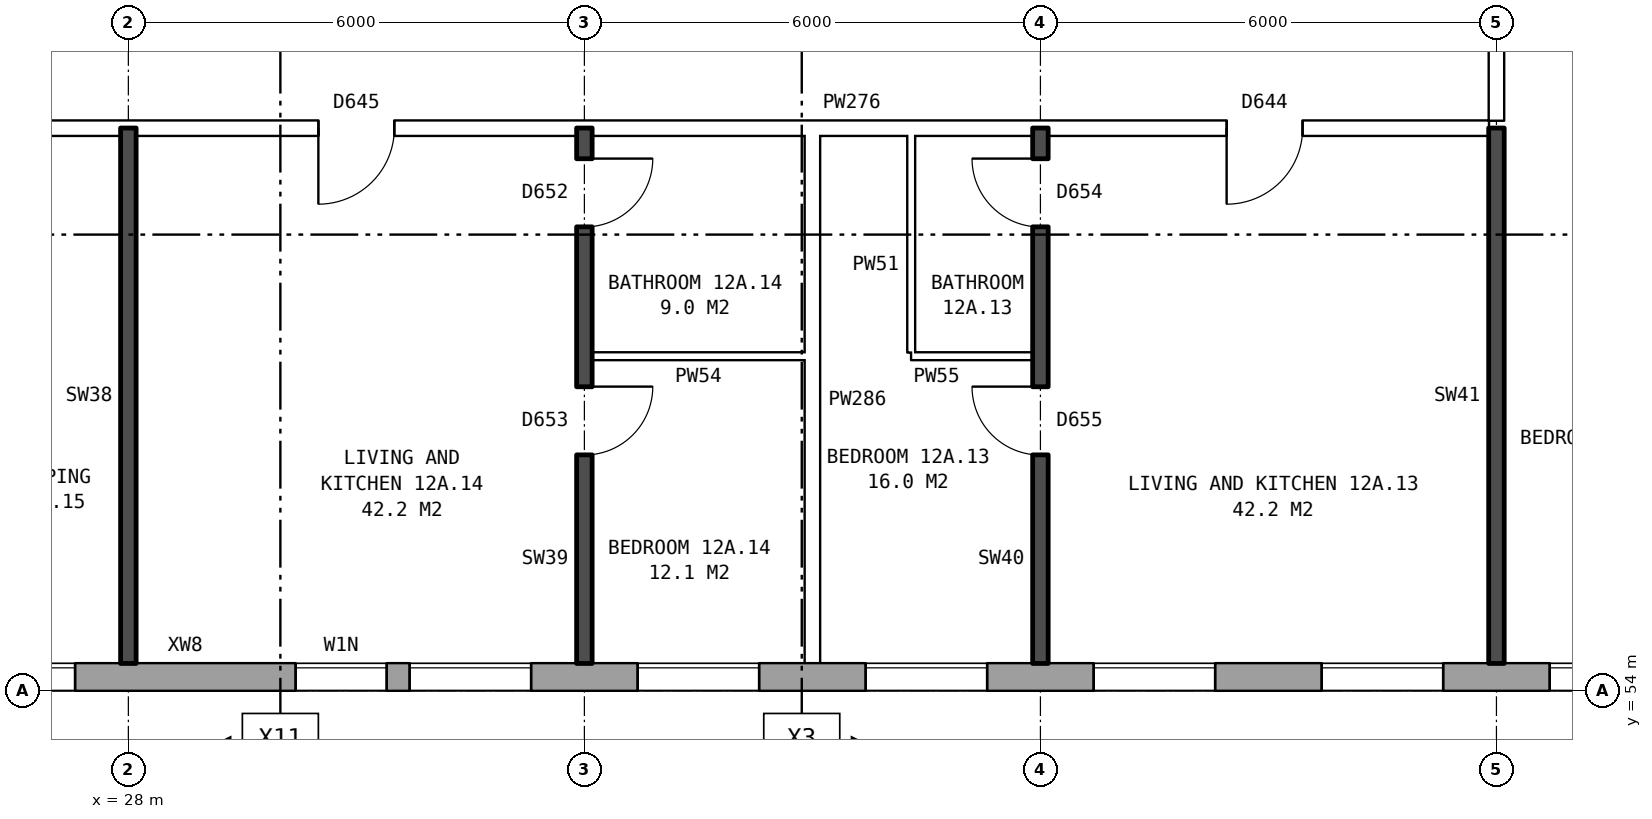
"""IFC4 building model, lengths in metres.
Left out: names, types, materials, properties, quantities, classifications, styles, units other than length and angle.
Written with IfcOpenShell. Run it as: python <this file> out.ifc"""

import sys

from ifc_helpers import new_model, si_unit, direction, frame, frame_2d, origin, place, context, subcontext, project, spatial, rectangle, extrude, element, fill, save


model = new_model("IFC4")
c1 = context("Model", 3, precision=1e-05, world=origin(), true_north=direction((0.0, 1.0)))
c2 = subcontext(c1, "Body", "Model", "MODEL_VIEW")
j1 = project(units=[si_unit("LENGTHUNIT", "METRE"), si_unit("PLANEANGLEUNIT", "RADIAN")], contexts=[c1])
p1 = place(None, origin())
s1 = spatial("IfcSite", under=j1, at=p1, CompositionType="ELEMENT")
p2 = place(p1, origin())
s2 = spatial("IfcBuilding", under=s1, at=p2, CompositionType="ELEMENT")
p3 = place(p2, frame((0.0, 0.0, 47.4)))
s3 = spatial("IfcBuildingStorey", under=s2, at=p3, CompositionType="ELEMENT", Elevation=47.4)
p4 = place(p3, frame((24.575, 54.18, 0.0), z_axis=(0.0, 0.0, 1.0), x_axis=(1.0, 0.0, 0.0)))
e1 = element("IfcWall", 1, at=p4, inside=s3, PredefinedType="STANDARD", context=c2, shape_type="SweptSolid", body=[
    extrude(rectangle(XDim=48.351, YDim=0.36, at=frame_2d((24.175, 0.0))), origin(), (0.0, 0.0, 1.0), 2.85),
])
p5 = place(p4, frame((1.125, 0.0, 0.8)))
e2 = element("IfcOpeningElement", 2, at=p5, cuts=e1, PredefinedType="OPENING", context=c2, shape_type="SweptSolid", body=[
    extrude(rectangle(XDim=1.6, YDim=1.8, at=frame_2d((0.8, 0.9))), frame((0.0, 0.19, 0.0), z_axis=(0.0, -1.0, 0.0), x_axis=(1.0, 0.0, 0.0)), (0.0, 0.0, 1.0), 0.38),
])
p6 = place(p4, frame((5.625, 0.0, 0.8)))
e3 = element("IfcOpeningElement", 3, at=p6, cuts=e1, PredefinedType="OPENING", context=c2, shape_type="SweptSolid", body=[
    extrude(rectangle(XDim=1.2, YDim=1.2, at=frame_2d((0.6, 0.6))), frame((0.0, 0.19, 0.0), z_axis=(0.0, -1.0, 0.0), x_axis=(1.0, 0.0, 0.0)), (0.0, 0.0, 1.0), 0.38),
])
p7 = place(p4, frame((7.125, 0.0, 0.8)))
e4 = element("IfcOpeningElement", 4, at=p7, cuts=e1, PredefinedType="OPENING", context=c2, shape_type="SweptSolid", body=[
    extrude(rectangle(XDim=1.6, YDim=1.8, at=frame_2d((0.8, 0.9))), frame((0.0, 0.19, 0.0), z_axis=(0.0, -1.0, 0.0), x_axis=(1.0, 0.0, 0.0)), (0.0, 0.0, 1.0), 0.38),
])
p8 = place(p4, frame((10.125, 0.0, 0.8)))
e5 = element("IfcOpeningElement", 5, at=p8, cuts=e1, PredefinedType="OPENING", context=c2, shape_type="SweptSolid", body=[
    extrude(rectangle(XDim=1.6, YDim=1.8, at=frame_2d((0.8, 0.9))), frame((0.0, 0.19, 0.0), z_axis=(0.0, -1.0, 0.0), x_axis=(1.0, 0.0, 0.0)), (0.0, 0.0, 1.0), 0.38),
])
p9 = place(p4, frame((13.125, 0.0, 0.8)))
e6 = element("IfcOpeningElement", 6, at=p9, cuts=e1, PredefinedType="OPENING", context=c2, shape_type="SweptSolid", body=[
    extrude(rectangle(XDim=1.6, YDim=1.8, at=frame_2d((0.8, 0.9))), frame((0.0, 0.19, 0.0), z_axis=(0.0, -1.0, 0.0), x_axis=(1.0, 0.0, 0.0)), (0.0, 0.0, 1.0), 0.38),
])
p10 = place(p4, frame((16.125, 0.0, 0.8)))
e7 = element("IfcOpeningElement", 7, at=p10, cuts=e1, PredefinedType="OPENING", context=c2, shape_type="SweptSolid", body=[
    extrude(rectangle(XDim=1.6, YDim=1.8, at=frame_2d((0.8, 0.9))), frame((0.0, 0.19, 0.0), z_axis=(0.0, -1.0, 0.0), x_axis=(1.0, 0.0, 0.0)), (0.0, 0.0, 1.0), 0.38),
])
p11 = place(p4, frame((19.125, 0.0, 0.8)))
e8 = element("IfcOpeningElement", 8, at=p11, cuts=e1, PredefinedType="OPENING", context=c2, shape_type="SweptSolid", body=[
    extrude(rectangle(XDim=1.6, YDim=1.8, at=frame_2d((0.8, 0.9))), frame((0.0, 0.19, 0.0), z_axis=(0.0, -1.0, 0.0), x_axis=(1.0, 0.0, 0.0)), (0.0, 0.0, 1.0), 0.38),
])
p12 = place(p4, frame((22.125, 0.0, 0.8)))
e9 = element("IfcOpeningElement", 9, at=p12, cuts=e1, PredefinedType="OPENING", context=c2, shape_type="SweptSolid", body=[
    extrude(rectangle(XDim=1.6, YDim=1.8, at=frame_2d((0.8, 0.9))), frame((0.0, 0.19, 0.0), z_axis=(0.0, -1.0, 0.0), x_axis=(1.0, 0.0, 0.0)), (0.0, 0.0, 1.0), 0.38),
])
p13 = place(p4, frame((25.125, 0.0, 0.8)))
e10 = element("IfcOpeningElement", 10, at=p13, cuts=e1, PredefinedType="OPENING", context=c2, shape_type="SweptSolid", body=[
    extrude(rectangle(XDim=1.6, YDim=1.8, at=frame_2d((0.8, 0.9))), frame((0.0, 0.19, 0.0), z_axis=(0.0, -1.0, 0.0), x_axis=(1.0, 0.0, 0.0)), (0.0, 0.0, 1.0), 0.38),
])
p14 = place(p4, frame((28.125, 0.0, 0.8)))
e11 = element("IfcOpeningElement", 11, at=p14, cuts=e1, PredefinedType="OPENING", context=c2, shape_type="SweptSolid", body=[
    extrude(rectangle(XDim=1.6, YDim=1.8, at=frame_2d((0.8, 0.9))), frame((0.0, 0.19, 0.0), z_axis=(0.0, -1.0, 0.0), x_axis=(1.0, 0.0, 0.0)), (0.0, 0.0, 1.0), 0.38),
])
p15 = place(p4, frame((31.125, 0.0, 0.8)))
e12 = element("IfcOpeningElement", 12, at=p15, cuts=e1, PredefinedType="OPENING", context=c2, shape_type="SweptSolid", body=[
    extrude(rectangle(XDim=1.6, YDim=1.8, at=frame_2d((0.8, 0.9))), frame((0.0, 0.19, 0.0), z_axis=(0.0, -1.0, 0.0), x_axis=(1.0, 0.0, 0.0)), (0.0, 0.0, 1.0), 0.38),
])
p16 = place(p4, frame((34.125, 0.0, 0.8)))
e13 = element("IfcOpeningElement", 13, at=p16, cuts=e1, PredefinedType="OPENING", context=c2, shape_type="SweptSolid", body=[
    extrude(rectangle(XDim=1.6, YDim=1.8, at=frame_2d((0.8, 0.9))), frame((0.0, 0.19, 0.0), z_axis=(0.0, -1.0, 0.0), x_axis=(1.0, 0.0, 0.0)), (0.0, 0.0, 1.0), 0.38),
])
p17 = place(p4, frame((37.125, 0.0, 0.8)))
e14 = element("IfcOpeningElement", 14, at=p17, cuts=e1, PredefinedType="OPENING", context=c2, shape_type="SweptSolid", body=[
    extrude(rectangle(XDim=1.6, YDim=1.8, at=frame_2d((0.8, 0.9))), frame((0.0, 0.19, 0.0), z_axis=(0.0, -1.0, 0.0), x_axis=(1.0, 0.0, 0.0)), (0.0, 0.0, 1.0), 0.38),
])
p18 = place(p4, frame((40.125, 0.0, 0.8)))
e15 = element("IfcOpeningElement", 15, at=p18, cuts=e1, PredefinedType="OPENING", context=c2, shape_type="SweptSolid", body=[
    extrude(rectangle(XDim=1.6, YDim=1.8, at=frame_2d((0.8, 0.9))), frame((0.0, 0.19, 0.0), z_axis=(0.0, -1.0, 0.0), x_axis=(1.0, 0.0, 0.0)), (0.0, 0.0, 1.0), 0.38),
])
p19 = place(p4, frame((42.025, 0.0, 0.8)))
e16 = element("IfcOpeningElement", 16, at=p19, cuts=e1, PredefinedType="OPENING", context=c2, shape_type="SweptSolid", body=[
    extrude(rectangle(XDim=1.0, YDim=0.9, at=frame_2d((0.5, 0.45))), frame((0.0, 0.19, 0.0), z_axis=(0.0, -1.0, 0.0), x_axis=(1.0, 0.0, 0.0)), (0.0, 0.0, 1.0), 0.38),
])
p20 = place(p4, frame((46.125, 0.0, 0.8)))
e17 = element("IfcOpeningElement", 17, at=p20, cuts=e1, PredefinedType="OPENING", context=c2, shape_type="SweptSolid", body=[
    extrude(rectangle(XDim=1.6, YDim=1.8, at=frame_2d((0.8, 0.9))), frame((0.0, 0.19, 0.0), z_axis=(0.0, -1.0, 0.0), x_axis=(1.0, 0.0, 0.0)), (0.0, 0.0, 1.0), 0.38),
])
p21 = place(p4, frame((44.525, 0.0, 1.7)))
e18 = element("IfcOpeningElement", 18, at=p21, cuts=e1, PredefinedType="OPENING", context=c2, shape_type="SweptSolid", body=[
    extrude(rectangle(XDim=0.6, YDim=0.9, at=frame_2d((0.3, 0.45))), frame((0.0, 0.19, 0.0), z_axis=(0.0, -1.0, 0.0), x_axis=(1.0, 0.0, 0.0)), (0.0, 0.0, 1.0), 0.38),
])
p22 = place(p3, frame((34.1, 58.4, 0.0), z_axis=(0.0, 0.0, 1.0), x_axis=(1.0, 0.0, 0.0)))
e19 = element("IfcWall", 19, at=p22, inside=s3, PredefinedType="PARTITIONING", context=c2, shape_type="SweptSolid", body=[
    extrude(rectangle(XDim=2.8, YDim=0.1, at=frame_2d((1.4, 0.0))), origin(), (0.0, 0.0, 1.0), 2.85),
])
p23 = place(p3, frame((38.3, 58.4, 0.0), z_axis=(0.0, 0.0, 1.0), x_axis=(1.0, 0.0, 0.0)))
e20 = element("IfcWall", 20, at=p23, inside=s3, PredefinedType="PARTITIONING", context=c2, shape_type="SweptSolid", body=[
    extrude(rectangle(XDim=1.6, YDim=0.1, at=frame_2d((0.8, 0.0))), origin(), (0.0, 0.0, 1.0), 2.85),
])
p24 = place(p3, frame((21.86, 61.4, 0.0), z_axis=(0.0, 0.0, 1.0), x_axis=(1.0, 0.0, 0.0)))
e21 = element("IfcWall", 21, at=p24, inside=s3, PredefinedType="PARTITIONING", context=c2, shape_type="SweptSolid", body=[
    extrude(rectangle(XDim=24.04, YDim=0.2, at=frame_2d((12.02, 0.0))), origin(), (0.0, 0.0, 1.0), 2.85),
])
p25 = place(p24, frame((20.59, 0.0, 0.0)))
e22 = element("IfcOpeningElement", 22, at=p25, cuts=e21, PredefinedType="OPENING", context=c2, shape_type="SweptSolid", body=[
    extrude(rectangle(XDim=1.0, YDim=2.1, at=frame_2d((0.5, 1.05))), frame((0.0, 0.11, 0.0), z_axis=(0.0, -1.0, 0.0), x_axis=(1.0, 0.0, 0.0)), (0.0, 0.0, 1.0), 0.22),
])
p26 = place(p24, frame((8.64, 0.0, 0.0)))
e23 = element("IfcOpeningElement", 23, at=p26, cuts=e21, PredefinedType="OPENING", context=c2, shape_type="SweptSolid", body=[
    extrude(rectangle(XDim=1.0, YDim=2.1, at=frame_2d((0.5, 1.05))), frame((0.0, 0.11, 0.0), z_axis=(0.0, -1.0, 0.0), x_axis=(1.0, 0.0, 0.0)), (0.0, 0.0, 1.0), 0.22),
])
p27 = place(p24, frame((3.64, 0.0, 0.0)))
e24 = element("IfcOpeningElement", 24, at=p27, cuts=e21, PredefinedType="OPENING", context=c2, shape_type="SweptSolid", body=[
    extrude(rectangle(XDim=1.0, YDim=2.1, at=frame_2d((0.5, 1.05))), frame((0.0, 0.11, 0.0), z_axis=(0.0, -1.0, 0.0), x_axis=(1.0, 0.0, 0.0)), (0.0, 0.0, 1.0), 0.22),
])
p28 = place(p3, frame((28.0, 54.36, 0.0), z_axis=(0.0, 0.0, 1.0), x_axis=(0.0, 1.0, 0.0)))
e25 = element("IfcWall", 25, at=p28, inside=s3, PredefinedType="SOLIDWALL", context=c2, shape_type="SweptSolid", body=[
    extrude(rectangle(XDim=7.04, YDim=0.2, at=frame_2d((3.52, 0.0))), origin(), (0.0, 0.0, 1.0), 2.85),
])
p29 = place(p3, frame((34.0, 54.36, 0.0), z_axis=(0.0, 0.0, 1.0), x_axis=(0.0, 1.0, 0.0)))
e26 = element("IfcWall", 26, at=p29, inside=s3, PredefinedType="SOLIDWALL", context=c2, shape_type="SweptSolid", body=[
    extrude(rectangle(XDim=7.04, YDim=0.2, at=frame_2d((3.52, 0.0))), origin(), (0.0, 0.0, 1.0), 2.85),
])
p30 = place(p29, frame((2.74, 0.0, 0.0)))
e27 = element("IfcOpeningElement", 27, at=p30, cuts=e26, PredefinedType="OPENING", context=c2, shape_type="SweptSolid", body=[
    extrude(rectangle(XDim=0.9, YDim=2.1, at=frame_2d((0.45, 1.05))), frame((0.0, 0.11, 0.0), z_axis=(0.0, -1.0, 0.0), x_axis=(1.0, 0.0, 0.0)), (0.0, 0.0, 1.0), 0.22),
])
p31 = place(p29, frame((5.74, 0.0, 0.0)))
e28 = element("IfcOpeningElement", 28, at=p31, cuts=e26, PredefinedType="OPENING", context=c2, shape_type="SweptSolid", body=[
    extrude(rectangle(XDim=0.9, YDim=2.1, at=frame_2d((0.45, 1.05))), frame((0.0, 0.11, 0.0), z_axis=(0.0, -1.0, 0.0), x_axis=(1.0, 0.0, 0.0)), (0.0, 0.0, 1.0), 0.22),
])
p32 = place(p3, frame((37.0, 54.36, 0.0), z_axis=(0.0, 0.0, 1.0), x_axis=(0.0, 1.0, 0.0)))
e29 = element("IfcWall", 29, at=p32, inside=s3, PredefinedType="PARTITIONING", context=c2, shape_type="SweptSolid", body=[
    extrude(rectangle(XDim=6.94, YDim=0.2, at=frame_2d((3.47, 0.0))), origin(), (0.0, 0.0, 1.0), 2.85),
])
p33 = place(p3, frame((38.3, 58.45, 0.0), z_axis=(0.0, 0.0, 1.0), x_axis=(0.0, 1.0, 0.0)))
e30 = element("IfcWall", 30, at=p33, inside=s3, PredefinedType="PARTITIONING", context=c2, shape_type="SweptSolid", body=[
    extrude(rectangle(XDim=2.85, YDim=0.1, at=frame_2d((1.425, 0.0))), origin(), (0.0, 0.0, 1.0), 2.85),
])
p34 = place(p3, frame((40.0, 54.36, 0.0), z_axis=(0.0, 0.0, 1.0), x_axis=(0.0, 1.0, 0.0)))
e31 = element("IfcWall", 31, at=p34, inside=s3, PredefinedType="SOLIDWALL", context=c2, shape_type="SweptSolid", body=[
    extrude(rectangle(XDim=7.04, YDim=0.2, at=frame_2d((3.52, 0.0))), origin(), (0.0, 0.0, 1.0), 2.85),
])
p35 = place(p34, frame((2.74, 0.0, 0.0)))
e32 = element("IfcOpeningElement", 32, at=p35, cuts=e31, PredefinedType="OPENING", context=c2, shape_type="SweptSolid", body=[
    extrude(rectangle(XDim=0.9, YDim=2.1, at=frame_2d((0.45, 1.05))), frame((0.0, 0.11, 0.0), z_axis=(0.0, -1.0, 0.0), x_axis=(1.0, 0.0, 0.0)), (0.0, 0.0, 1.0), 0.22),
])
p36 = place(p34, frame((5.74, 0.0, 0.0)))
e33 = element("IfcOpeningElement", 33, at=p36, cuts=e31, PredefinedType="OPENING", context=c2, shape_type="SweptSolid", body=[
    extrude(rectangle(XDim=0.9, YDim=2.1, at=frame_2d((0.45, 1.05))), frame((0.0, 0.11, 0.0), z_axis=(0.0, -1.0, 0.0), x_axis=(1.0, 0.0, 0.0)), (0.0, 0.0, 1.0), 0.22),
])
p37 = place(p3, frame((46.0, 54.36, 0.0), z_axis=(0.0, 0.0, 1.0), x_axis=(0.0, 1.0, 0.0)))
e34 = element("IfcWall", 34, at=p37, inside=s3, PredefinedType="SOLIDWALL", context=c2, shape_type="SweptSolid", body=[
    extrude(rectangle(XDim=7.04, YDim=0.2, at=frame_2d((3.52, 0.0))), origin(), (0.0, 0.0, 1.0), 2.85),
])
p38 = place(p3, frame((46.0, 61.5, 0.0), z_axis=(0.0, 0.0, 1.0), x_axis=(0.0, 1.0, 0.0)))
e35 = element("IfcWall", 35, at=p38, inside=s3, PredefinedType="PARTITIONING", context=c2, shape_type="SweptSolid", body=[
    extrude(rectangle(XDim=2.2, YDim=0.2, at=frame_2d((1.1, 0.0))), origin(), (0.0, 0.0, 1.0), 2.85),
])
p39 = place(p5, origin())
e36 = element("IfcWindow", 36, at=p39, inside=s3, PartitioningType="SINGLE_PANEL", PredefinedType="WINDOW", context=c2, shape_type="SweptSolid", body=[
    extrude(rectangle(XDim=1.6, YDim=1.8, at=frame_2d((0.8, 0.9))), frame((0.0, 0.15, 0.0), z_axis=(0.0, -1.0, 0.0), x_axis=(1.0, 0.0, 0.0)), (0.0, 0.0, 1.0), 0.06),
])
fill(e2, e36)
p40 = place(p6, origin())
e37 = element("IfcWindow", 37, at=p40, inside=s3, PartitioningType="SINGLE_PANEL", PredefinedType="WINDOW", context=c2, shape_type="SweptSolid", body=[
    extrude(rectangle(XDim=1.2, YDim=1.2, at=frame_2d((0.6, 0.6))), frame((0.0, 0.15, 0.0), z_axis=(0.0, -1.0, 0.0), x_axis=(1.0, 0.0, 0.0)), (0.0, 0.0, 1.0), 0.06),
])
fill(e3, e37)
p41 = place(p7, origin())
e38 = element("IfcWindow", 38, at=p41, inside=s3, PartitioningType="SINGLE_PANEL", PredefinedType="WINDOW", context=c2, shape_type="SweptSolid", body=[
    extrude(rectangle(XDim=1.6, YDim=1.8, at=frame_2d((0.8, 0.9))), frame((0.0, 0.15, 0.0), z_axis=(0.0, -1.0, 0.0), x_axis=(1.0, 0.0, 0.0)), (0.0, 0.0, 1.0), 0.06),
])
fill(e4, e38)
p42 = place(p8, origin())
e39 = element("IfcWindow", 39, at=p42, inside=s3, PartitioningType="SINGLE_PANEL", PredefinedType="WINDOW", context=c2, shape_type="SweptSolid", body=[
    extrude(rectangle(XDim=1.6, YDim=1.8, at=frame_2d((0.8, 0.9))), frame((0.0, 0.15, 0.0), z_axis=(0.0, -1.0, 0.0), x_axis=(1.0, 0.0, 0.0)), (0.0, 0.0, 1.0), 0.06),
])
fill(e5, e39)
p43 = place(p9, origin())
e40 = element("IfcWindow", 40, at=p43, inside=s3, PartitioningType="SINGLE_PANEL", PredefinedType="WINDOW", context=c2, shape_type="SweptSolid", body=[
    extrude(rectangle(XDim=1.6, YDim=1.8, at=frame_2d((0.8, 0.9))), frame((0.0, 0.15, 0.0), z_axis=(0.0, -1.0, 0.0), x_axis=(1.0, 0.0, 0.0)), (0.0, 0.0, 1.0), 0.06),
])
fill(e6, e40)
p44 = place(p10, origin())
e41 = element("IfcWindow", 41, at=p44, inside=s3, PartitioningType="SINGLE_PANEL", PredefinedType="WINDOW", context=c2, shape_type="SweptSolid", body=[
    extrude(rectangle(XDim=1.6, YDim=1.8, at=frame_2d((0.8, 0.9))), frame((0.0, 0.15, 0.0), z_axis=(0.0, -1.0, 0.0), x_axis=(1.0, 0.0, 0.0)), (0.0, 0.0, 1.0), 0.06),
])
fill(e7, e41)
p45 = place(p11, origin())
e42 = element("IfcWindow", 42, at=p45, inside=s3, PartitioningType="SINGLE_PANEL", PredefinedType="WINDOW", context=c2, shape_type="SweptSolid", body=[
    extrude(rectangle(XDim=1.6, YDim=1.8, at=frame_2d((0.8, 0.9))), frame((0.0, 0.15, 0.0), z_axis=(0.0, -1.0, 0.0), x_axis=(1.0, 0.0, 0.0)), (0.0, 0.0, 1.0), 0.06),
])
fill(e8, e42)
p46 = place(p12, origin())
e43 = element("IfcWindow", 43, at=p46, inside=s3, PartitioningType="SINGLE_PANEL", PredefinedType="WINDOW", context=c2, shape_type="SweptSolid", body=[
    extrude(rectangle(XDim=1.6, YDim=1.8, at=frame_2d((0.8, 0.9))), frame((0.0, 0.15, 0.0), z_axis=(0.0, -1.0, 0.0), x_axis=(1.0, 0.0, 0.0)), (0.0, 0.0, 1.0), 0.06),
])
fill(e9, e43)
p47 = place(p35, origin())
e44 = element("IfcDoor", 44, at=p47, inside=s3, OperationType="SINGLE_SWING_RIGHT", PredefinedType="DOOR", context=c2, shape_type="SweptSolid", body=[
    extrude(rectangle(XDim=0.9, YDim=2.1, at=frame_2d((0.45, 1.05))), frame((0.0, 0.025, 0.0), z_axis=(0.0, -1.0, 0.0), x_axis=(1.0, 0.0, 0.0)), (0.0, 0.0, 1.0), 0.05),
])
fill(e32, e44)
p48 = place(p25, frame((1.0, 0.0, 0.0), z_axis=(0.0, 0.0, 1.0), x_axis=(-1.0, 0.0, 0.0)))
e45 = element("IfcDoor", 45, at=p48, inside=s3, OperationType="SINGLE_SWING_RIGHT", PredefinedType="DOOR", context=c2, shape_type="SweptSolid", body=[
    extrude(rectangle(XDim=1.0, YDim=2.1, at=frame_2d((0.5, 1.05))), frame((0.0, 0.025, 0.0), z_axis=(0.0, -1.0, 0.0), x_axis=(1.0, 0.0, 0.0)), (0.0, 0.0, 1.0), 0.05),
])
fill(e22, e45)
p49 = place(p36, origin())
e46 = element("IfcDoor", 46, at=p49, inside=s3, OperationType="SINGLE_SWING_RIGHT", PredefinedType="DOOR", context=c2, shape_type="SweptSolid", body=[
    extrude(rectangle(XDim=0.9, YDim=2.1, at=frame_2d((0.45, 1.05))), frame((0.0, 0.025, 0.0), z_axis=(0.0, -1.0, 0.0), x_axis=(1.0, 0.0, 0.0)), (0.0, 0.0, 1.0), 0.05),
])
fill(e33, e46)
p50 = place(p30, frame((0.9, 0.0, 0.0), z_axis=(0.0, 0.0, 1.0), x_axis=(-1.0, 0.0, 0.0)))
e47 = element("IfcDoor", 47, at=p50, inside=s3, OperationType="SINGLE_SWING_LEFT", PredefinedType="DOOR", context=c2, shape_type="SweptSolid", body=[
    extrude(rectangle(XDim=0.9, YDim=2.1, at=frame_2d((0.45, 1.05))), frame((0.0, 0.025, 0.0), z_axis=(0.0, -1.0, 0.0), x_axis=(1.0, 0.0, 0.0)), (0.0, 0.0, 1.0), 0.05),
])
fill(e27, e47)
p51 = place(p26, frame((1.0, 0.0, 0.0), z_axis=(0.0, 0.0, 1.0), x_axis=(-1.0, 0.0, 0.0)))
e48 = element("IfcDoor", 48, at=p51, inside=s3, OperationType="SINGLE_SWING_RIGHT", PredefinedType="DOOR", context=c2, shape_type="SweptSolid", body=[
    extrude(rectangle(XDim=1.0, YDim=2.1, at=frame_2d((0.5, 1.05))), frame((0.0, 0.025, 0.0), z_axis=(0.0, -1.0, 0.0), x_axis=(1.0, 0.0, 0.0)), (0.0, 0.0, 1.0), 0.05),
])
fill(e23, e48)
p52 = place(p31, frame((0.9, 0.0, 0.0), z_axis=(0.0, 0.0, 1.0), x_axis=(-1.0, 0.0, 0.0)))
e49 = element("IfcDoor", 49, at=p52, inside=s3, OperationType="SINGLE_SWING_LEFT", PredefinedType="DOOR", context=c2, shape_type="SweptSolid", body=[
    extrude(rectangle(XDim=0.9, YDim=2.1, at=frame_2d((0.45, 1.05))), frame((0.0, 0.025, 0.0), z_axis=(0.0, -1.0, 0.0), x_axis=(1.0, 0.0, 0.0)), (0.0, 0.0, 1.0), 0.05),
])
fill(e28, e49)
save(model, sys.argv[1])
